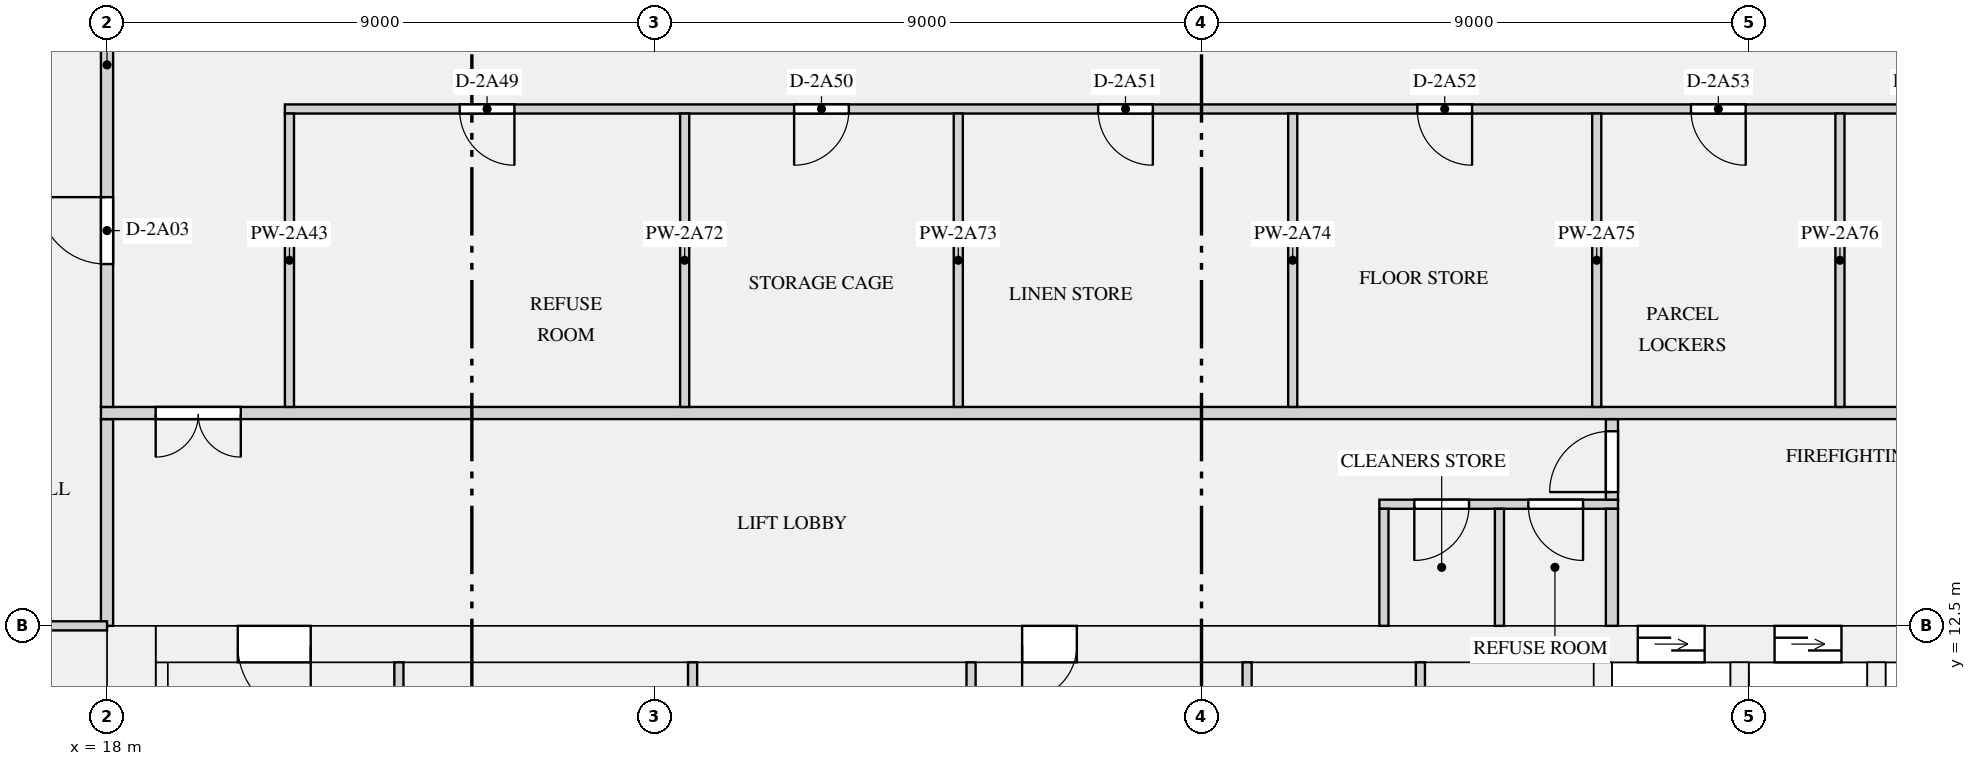
"""IFC4 building model, lengths in metres.
Left out: names, types, materials, properties, quantities, classifications, styles, units other than length and angle.
Written with IfcOpenShell. Run it as: python <this file> out.ifc"""

import sys

from ifc_helpers import new_model, si_unit, direction, frame, frame_2d, origin, place, context, subcontext, project, spatial, rectangle, extrude, element, fill, save


model = new_model("IFC4")
c1 = context("Model", 3, precision=1e-05, world=origin(), true_north=direction((0.0, 1.0)))
c2 = subcontext(c1, "Body", "Model", "MODEL_VIEW")
j1 = project(units=[si_unit("LENGTHUNIT", "METRE"), si_unit("PLANEANGLEUNIT", "RADIAN")], contexts=[c1])
p1 = place(None, origin())
s1 = spatial("IfcSite", under=j1, at=p1, CompositionType="ELEMENT")
p2 = place(p1, origin())
s2 = spatial("IfcBuilding", under=s1, at=p2, CompositionType="ELEMENT")
p3 = place(p2, frame((0.0, 0.0, 83.55)))
s3 = spatial("IfcBuildingStorey", under=s2, at=p3, CompositionType="ELEMENT", Elevation=83.55)
p4 = place(p3, frame((18.4, 0.0, 0.0), z_axis=(0.0, 0.0, 1.0), x_axis=(0.0, 1.0, 0.0)))
e1 = element("IfcWall", 1, at=p4, inside=s3, PredefinedType="SHEAR", context=c2, shape_type="SweptSolid", body=[
    extrude(rectangle(XDim=12.5, YDim=0.8, at=frame_2d((6.25, 0.0))), origin(), (0.0, 0.0, 1.0), 3.15),
])
p5 = place(p3, frame((18.8, 12.2, 0.0), z_axis=(0.0, 0.0, 1.0), x_axis=(1.0, 0.0, 0.0)))
e2 = element("IfcWall", 2, at=p5, inside=s3, PredefinedType="SHEAR", context=c2, shape_type="SweptSolid", body=[
    extrude(rectangle(XDim=34.4, YDim=0.6, at=frame_2d((17.2, 0.0))), origin(), (0.0, 0.0, 1.0), 3.15),
])
p6 = place(p5, frame((24.375, 0.0, 0.0)))
e3 = element("IfcOpeningElement", 3, at=p6, cuts=e2, PredefinedType="OPENING", context=c2, shape_type="SweptSolid", body=[
    extrude(rectangle(XDim=1.1, YDim=2.1, at=frame_2d((0.55, 1.05))), frame((0.0, 0.31, 0.0), z_axis=(0.0, -1.0, 0.0), x_axis=(1.0, 0.0, 0.0)), (0.0, 0.0, 1.0), 0.62),
])
p7 = place(p5, frame((26.625, 0.0, 0.0)))
e4 = element("IfcOpeningElement", 4, at=p7, cuts=e2, PredefinedType="OPENING", context=c2, shape_type="SweptSolid", body=[
    extrude(rectangle(XDim=1.1, YDim=2.1, at=frame_2d((0.55, 1.05))), frame((0.0, 0.31, 0.0), z_axis=(0.0, -1.0, 0.0), x_axis=(1.0, 0.0, 0.0)), (0.0, 0.0, 1.0), 0.62),
])
p8 = place(p5, frame((28.875, 0.0, 0.0)))
e5 = element("IfcOpeningElement", 5, at=p8, cuts=e2, PredefinedType="OPENING", context=c2, shape_type="SweptSolid", body=[
    extrude(rectangle(XDim=1.1, YDim=2.1, at=frame_2d((0.55, 1.05))), frame((0.0, 0.31, 0.0), z_axis=(0.0, -1.0, 0.0), x_axis=(1.0, 0.0, 0.0)), (0.0, 0.0, 1.0), 0.62),
])
p9 = place(p5, frame((14.25, 0.0, 0.0)))
e6 = element("IfcOpeningElement", 6, at=p9, cuts=e2, PredefinedType="OPENING", context=c2, shape_type="SweptSolid", body=[
    extrude(rectangle(XDim=0.9, YDim=2.1, at=frame_2d((0.45, 1.05))), frame((0.0, 0.31, 0.0), z_axis=(0.0, -1.0, 0.0), x_axis=(1.0, 0.0, 0.0)), (0.0, 0.0, 1.0), 0.62),
])
p10 = place(p5, frame((1.35, 0.0, 0.0)))
e7 = element("IfcOpeningElement", 7, at=p10, cuts=e2, PredefinedType="OPENING", context=c2, shape_type="SweptSolid", body=[
    extrude(rectangle(XDim=1.2, YDim=2.1, at=frame_2d((0.6, 1.05))), frame((0.0, 0.31, 0.0), z_axis=(0.0, -1.0, 0.0), x_axis=(1.0, 0.0, 0.0)), (0.0, 0.0, 1.0), 0.62),
])
p11 = place(p5, frame((31.85, 0.0, 0.0)))
e8 = element("IfcOpeningElement", 8, at=p11, cuts=e2, PredefinedType="OPENING", context=c2, shape_type="SweptSolid", body=[
    extrude(rectangle(XDim=1.2, YDim=2.1, at=frame_2d((0.6, 1.05))), frame((0.0, 0.31, 0.0), z_axis=(0.0, -1.0, 0.0), x_axis=(1.0, 0.0, 0.0)), (0.0, 0.0, 1.0), 0.62),
])
p12 = place(p3, frame((18.9, 1.0, 0.0), z_axis=(0.0, 0.0, 1.0), x_axis=(0.0, 1.0, 0.0)))
e9 = element("IfcWall", 9, at=p12, inside=s3, PredefinedType="SHEAR", context=c2, shape_type="SweptSolid", body=[
    extrude(rectangle(XDim=10.9, YDim=0.2, at=frame_2d((5.45, 0.0))), origin(), (0.0, 0.0, 1.0), 3.15),
])
for number, where, z_axis, x_axis in (
    (10, (42.6, 8.25, 0.0), (0.0, 0.0, 1.0), (0.0, 1.0, 0.0)),
    (11, (44.85, 8.25, 0.0), (0.0, 0.0, 1.0), (0.0, 1.0, 0.0)),
    (12, (47.1, 8.25, 0.0), (0.0, 0.0, 1.0), (0.0, 1.0, 0.0)),
):
    element("IfcWall", number, at=place(p3, frame(where, z_axis=z_axis, x_axis=x_axis)), inside=s3, PredefinedType="SHEAR", context=c2, shape_type="SweptSolid", body=[
        extrude(rectangle(XDim=3.65, YDim=0.3, at=frame_2d((1.825, 0.0))), origin(), (0.0, 0.0, 1.0), 3.15),
    ])
p13 = place(p3, frame((38.925, 14.5, 0.0), z_axis=(0.0, 0.0, 1.0), x_axis=(1.0, 0.0, 0.0)))
e13 = element("IfcWall", 13, at=p13, inside=s3, PredefinedType="PARTITIONING", context=c2, shape_type="SweptSolid", body=[
    extrude(rectangle(XDim=3.925, YDim=0.15, at=frame_2d((1.962, 0.0))), origin(), (0.0, 0.0, 1.0), 2.83),
])
p14 = place(p13, frame((0.575, 0.0, 0.0)))
e14 = element("IfcOpeningElement", 14, at=p14, cuts=e13, PredefinedType="OPENING", context=c2, shape_type="SweptSolid", body=[
    extrude(rectangle(XDim=0.9, YDim=2.1, at=frame_2d((0.45, 1.05))), frame((0.0, 0.085, 0.0), z_axis=(0.0, -1.0, 0.0), x_axis=(1.0, 0.0, 0.0)), (0.0, 0.0, 1.0), 0.17),
])
p15 = place(p13, frame((2.45, 0.0, 0.0)))
e15 = element("IfcOpeningElement", 15, at=p15, cuts=e13, PredefinedType="OPENING", context=c2, shape_type="SweptSolid", body=[
    extrude(rectangle(XDim=0.9, YDim=2.1, at=frame_2d((0.45, 1.05))), frame((0.0, 0.085, 0.0), z_axis=(0.0, -1.0, 0.0), x_axis=(1.0, 0.0, 0.0)), (0.0, 0.0, 1.0), 0.17),
])
for number, where, z_axis, x_axis in (
    (16, (22.8, 6.725, 0.0), (0.0, 0.0, 1.0), (0.0, 1.0, 0.0)),
    (17, (27.63, 6.725, 0.0), (0.0, 0.0, 1.0), (0.0, 1.0, 0.0)),
    (18, (39.6, 6.725, 0.0), (0.0, 0.0, 1.0), (0.0, 1.0, 0.0)),
):
    element("IfcWall", number, at=place(p3, frame(where, z_axis=z_axis, x_axis=x_axis)), inside=s3, PredefinedType="PARTITIONING", context=c2, shape_type="SweptSolid", body=[
        extrude(rectangle(XDim=5.175, YDim=0.15, at=frame_2d((2.587, 0.0))), origin(), (0.0, 0.0, 1.0), 2.83),
    ])
for number, where, z_axis, x_axis in (
    (19, (32.21, 9.345, 0.0), (0.0, 0.0, 1.0), (0.0, 1.0, 0.0)),
    (20, (36.75, 9.345, 0.0), (0.0, 0.0, 1.0), (0.0, 1.0, 0.0)),
):
    element("IfcWall", number, at=place(p3, frame(where, z_axis=z_axis, x_axis=x_axis)), inside=s3, PredefinedType="PARTITIONING", context=c2, shape_type="SweptSolid", body=[
        extrude(rectangle(XDim=2.555, YDim=0.15, at=frame_2d((1.277, 0.0))), origin(), (0.0, 0.0, 1.0), 2.83),
    ])
p16 = place(p3, frame((18.0, 12.5, 0.0), z_axis=(0.0, 0.0, 1.0), x_axis=(0.0, 1.0, 0.0)))
e21 = element("IfcWall", 21, at=p16, inside=s3, PredefinedType="PARTITIONING", context=c2, shape_type="SweptSolid", body=[
    extrude(rectangle(XDim=3.4, YDim=0.2, at=frame_2d((1.7, 0.0))), origin(), (0.0, 0.0, 1.0), 2.83),
])
for number, where, z_axis, x_axis in (
    (22, (39.0, 12.5, 0.0), (0.0, 0.0, 1.0), (0.0, 1.0, 0.0)),
    (23, (40.9, 12.5, 0.0), (0.0, 0.0, 1.0), (0.0, 1.0, 0.0)),
):
    element("IfcWall", number, at=place(p3, frame(where, z_axis=z_axis, x_axis=x_axis)), inside=s3, PredefinedType="PARTITIONING", context=c2, shape_type="SweptSolid", body=[
        extrude(rectangle(XDim=1.925, YDim=0.15, at=frame_2d((0.962, 0.0))), origin(), (0.0, 0.0, 1.0), 2.83),
    ])
p17 = place(p3, frame((42.75, 12.5, 0.0), z_axis=(0.0, 0.0, 1.0), x_axis=(0.0, 1.0, 0.0)))
e24 = element("IfcWall", 24, at=p17, inside=s3, PredefinedType="PARTITIONING", context=c2, shape_type="SweptSolid", body=[
    extrude(rectangle(XDim=1.925, YDim=0.2, at=frame_2d((0.962, 0.0))), origin(), (0.0, 0.0, 1.0), 2.83),
])
p18 = place(p3, frame((42.75, 14.575, 0.0), z_axis=(0.0, 0.0, 1.0), x_axis=(0.0, 1.0, 0.0)))
e25 = element("IfcWall", 25, at=p18, inside=s3, PredefinedType="PARTITIONING", context=c2, shape_type="SweptSolid", body=[
    extrude(rectangle(XDim=1.325, YDim=0.2, at=frame_2d((0.663, 0.0))), origin(), (0.0, 0.0, 1.0), 2.83),
])
p19 = place(p18, frame((0.125, 0.0, 0.0)))
e26 = element("IfcOpeningElement", 26, at=p19, cuts=e25, PredefinedType="OPENING", context=c2, shape_type="SweptSolid", body=[
    extrude(rectangle(XDim=1.0, YDim=2.1, at=frame_2d((0.5, 1.05))), frame((0.0, 0.11, 0.0), z_axis=(0.0, -1.0, 0.0), x_axis=(1.0, 0.0, 0.0)), (0.0, 0.0, 1.0), 0.22),
])
p20 = place(p3, frame((20.925, 21.0, 0.0), z_axis=(0.0, 0.0, 1.0), x_axis=(1.0, 0.0, 0.0)))
e27 = element("IfcWall", 27, at=p20, inside=s3, PredefinedType="PARTITIONING", context=c2, shape_type="SweptSolid", body=[
    extrude(rectangle(XDim=30.15, YDim=0.15, at=frame_2d((15.075, 0.0))), origin(), (0.0, 0.0, 1.0), 2.83),
])
p21 = place(p20, frame((2.875, 0.0, 0.0)))
e28 = element("IfcOpeningElement", 28, at=p21, cuts=e27, PredefinedType="OPENING", context=c2, shape_type="SweptSolid", body=[
    extrude(rectangle(XDim=0.9, YDim=2.1, at=frame_2d((0.45, 1.05))), frame((0.0, 0.085, 0.0), z_axis=(0.0, -1.0, 0.0), x_axis=(1.0, 0.0, 0.0)), (0.0, 0.0, 1.0), 0.17),
])
p22 = place(p20, frame((8.375, 0.0, 0.0)))
e29 = element("IfcOpeningElement", 29, at=p22, cuts=e27, PredefinedType="OPENING", context=c2, shape_type="SweptSolid", body=[
    extrude(rectangle(XDim=0.9, YDim=2.1, at=frame_2d((0.45, 1.05))), frame((0.0, 0.085, 0.0), z_axis=(0.0, -1.0, 0.0), x_axis=(1.0, 0.0, 0.0)), (0.0, 0.0, 1.0), 0.17),
])
p23 = place(p20, frame((13.375, 0.0, 0.0)))
e30 = element("IfcOpeningElement", 30, at=p23, cuts=e27, PredefinedType="OPENING", context=c2, shape_type="SweptSolid", body=[
    extrude(rectangle(XDim=0.9, YDim=2.1, at=frame_2d((0.45, 1.05))), frame((0.0, 0.085, 0.0), z_axis=(0.0, -1.0, 0.0), x_axis=(1.0, 0.0, 0.0)), (0.0, 0.0, 1.0), 0.17),
])
p24 = place(p20, frame((18.625, 0.0, 0.0)))
e31 = element("IfcOpeningElement", 31, at=p24, cuts=e27, PredefinedType="OPENING", context=c2, shape_type="SweptSolid", body=[
    extrude(rectangle(XDim=0.9, YDim=2.1, at=frame_2d((0.45, 1.05))), frame((0.0, 0.085, 0.0), z_axis=(0.0, -1.0, 0.0), x_axis=(1.0, 0.0, 0.0)), (0.0, 0.0, 1.0), 0.17),
])
p25 = place(p20, frame((23.125, 0.0, 0.0)))
e32 = element("IfcOpeningElement", 32, at=p25, cuts=e27, PredefinedType="OPENING", context=c2, shape_type="SweptSolid", body=[
    extrude(rectangle(XDim=0.9, YDim=2.1, at=frame_2d((0.45, 1.05))), frame((0.0, 0.085, 0.0), z_axis=(0.0, -1.0, 0.0), x_axis=(1.0, 0.0, 0.0)), (0.0, 0.0, 1.0), 0.17),
])
p26 = place(p3, frame((13.425, 12.5, 0.0), z_axis=(0.0, 0.0, 1.0), x_axis=(1.0, 0.0, 0.0)))
e33 = element("IfcWall", 33, at=p26, inside=s3, PredefinedType="PARTITIONING", context=c2, shape_type="SweptSolid", body=[
    extrude(rectangle(XDim=4.575, YDim=0.15, at=frame_2d((2.288, 0.0))), origin(), (0.0, 0.0, 1.0), 2.83),
])
p27 = place(p26, frame((1.875, 0.0, 0.0)))
e34 = element("IfcOpeningElement", 34, at=p27, cuts=e33, PredefinedType="OPENING", context=c2, shape_type="SweptSolid", body=[
    extrude(rectangle(XDim=0.9, YDim=2.1, at=frame_2d((0.45, 1.05))), frame((0.0, 0.085, 0.0), z_axis=(0.0, -1.0, 0.0), x_axis=(1.0, 0.0, 0.0)), (0.0, 0.0, 1.0), 0.17),
])
p28 = place(p3, frame((17.9, 16.0, 0.0), z_axis=(0.0, 0.0, 1.0), x_axis=(1.0, 0.0, 0.0)))
e35 = element("IfcWall", 35, at=p28, inside=s3, PredefinedType="PARTITIONING", context=c2, shape_type="SweptSolid", body=[
    extrude(rectangle(XDim=36.2, YDim=0.2, at=frame_2d((18.1, 0.0))), origin(), (0.0, 0.0, 1.0), 2.83),
])
p29 = place(p28, frame((0.9, 0.0, 0.0)))
e36 = element("IfcOpeningElement", 36, at=p29, cuts=e35, PredefinedType="OPENING", context=c2, shape_type="SweptSolid", body=[
    extrude(rectangle(XDim=1.4, YDim=2.1, at=frame_2d((0.7, 1.05))), frame((0.0, 0.11, 0.0), z_axis=(0.0, -1.0, 0.0), x_axis=(1.0, 0.0, 0.0)), (0.0, 0.0, 1.0), 0.22),
])
p30 = place(p28, frame((33.9, 0.0, 0.0)))
e37 = element("IfcOpeningElement", 37, at=p30, cuts=e35, PredefinedType="OPENING", context=c2, shape_type="SweptSolid", body=[
    extrude(rectangle(XDim=1.4, YDim=2.1, at=frame_2d((0.7, 1.05))), frame((0.0, 0.11, 0.0), z_axis=(0.0, -1.0, 0.0), x_axis=(1.0, 0.0, 0.0)), (0.0, 0.0, 1.0), 0.22),
])
p31 = place(p3, frame((18.0, 16.1, 0.0), z_axis=(0.0, 0.0, 1.0), x_axis=(0.0, 1.0, 0.0)))
e38 = element("IfcWall", 38, at=p31, inside=s3, PredefinedType="PARTITIONING", context=c2, shape_type="SweptSolid", body=[
    extrude(rectangle(XDim=7.8, YDim=0.2, at=frame_2d((3.9, 0.0))), origin(), (0.0, 0.0, 1.0), 2.83),
])
p32 = place(p31, frame((2.35, 0.0, 0.0)))
e39 = element("IfcOpeningElement", 39, at=p32, cuts=e38, PredefinedType="OPENING", context=c2, shape_type="SweptSolid", body=[
    extrude(rectangle(XDim=1.1, YDim=2.1, at=frame_2d((0.55, 1.05))), frame((0.0, 0.11, 0.0), z_axis=(0.0, -1.0, 0.0), x_axis=(1.0, 0.0, 0.0)), (0.0, 0.0, 1.0), 0.22),
])
for number, where, z_axis, x_axis in (
    (40, (21.0, 16.1, 0.0), (0.0, 0.0, 1.0), (0.0, 1.0, 0.0)),
    (41, (27.5, 16.1, 0.0), (0.0, 0.0, 1.0), (0.0, 1.0, 0.0)),
    (42, (32.0, 16.1, 0.0), (0.0, 0.0, 1.0), (0.0, 1.0, 0.0)),
    (43, (37.5, 16.1, 0.0), (0.0, 0.0, 1.0), (0.0, 1.0, 0.0)),
    (44, (42.5, 16.1, 0.0), (0.0, 0.0, 1.0), (0.0, 1.0, 0.0)),
    (45, (46.5, 16.1, 0.0), (0.0, 0.0, 1.0), (0.0, 1.0, 0.0)),
):
    element("IfcWall", number, at=place(p3, frame(where, z_axis=z_axis, x_axis=x_axis)), inside=s3, PredefinedType="PARTITIONING", context=c2, shape_type="SweptSolid", body=[
        extrude(rectangle(XDim=4.825, YDim=0.15, at=frame_2d((2.413, 0.0))), origin(), (0.0, 0.0, 1.0), 2.83),
    ])
p33 = place(p6, origin())
e46 = element("IfcDoor", 46, at=p33, inside=s3, OperationType="DOUBLE_DOOR_SLIDING", PredefinedType="DOOR", context=c2, shape_type="SweptSolid", body=[
    extrude(rectangle(XDim=1.1, YDim=2.1, at=frame_2d((0.55, 1.05))), frame((0.0, 0.025, 0.0), z_axis=(0.0, -1.0, 0.0), x_axis=(1.0, 0.0, 0.0)), (0.0, 0.0, 1.0), 0.05),
])
fill(e3, e46)
p34 = place(p7, origin())
e47 = element("IfcDoor", 47, at=p34, inside=s3, OperationType="DOUBLE_DOOR_SLIDING", PredefinedType="DOOR", context=c2, shape_type="SweptSolid", body=[
    extrude(rectangle(XDim=1.1, YDim=2.1, at=frame_2d((0.55, 1.05))), frame((0.0, 0.025, 0.0), z_axis=(0.0, -1.0, 0.0), x_axis=(1.0, 0.0, 0.0)), (0.0, 0.0, 1.0), 0.05),
])
fill(e4, e47)
p35 = place(p14, frame((0.9, 0.0, 0.0), z_axis=(0.0, 0.0, 1.0), x_axis=(-1.0, 0.0, 0.0)))
e48 = element("IfcDoor", 48, at=p35, inside=s3, OperationType="SINGLE_SWING_RIGHT", PredefinedType="DOOR", context=c2, shape_type="SweptSolid", body=[
    extrude(rectangle(XDim=0.9, YDim=2.1, at=frame_2d((0.45, 1.05))), frame((0.0, 0.025, 0.0), z_axis=(0.0, -1.0, 0.0), x_axis=(1.0, 0.0, 0.0)), (0.0, 0.0, 1.0), 0.05),
])
fill(e14, e48)
p36 = place(p15, frame((0.9, 0.0, 0.0), z_axis=(0.0, 0.0, 1.0), x_axis=(-1.0, 0.0, 0.0)))
e49 = element("IfcDoor", 49, at=p36, inside=s3, OperationType="SINGLE_SWING_LEFT", PredefinedType="DOOR", context=c2, shape_type="SweptSolid", body=[
    extrude(rectangle(XDim=0.9, YDim=2.1, at=frame_2d((0.45, 1.05))), frame((0.0, 0.025, 0.0), z_axis=(0.0, -1.0, 0.0), x_axis=(1.0, 0.0, 0.0)), (0.0, 0.0, 1.0), 0.05),
])
fill(e15, e49)
p37 = place(p9, frame((0.9, 0.0, 0.0), z_axis=(0.0, 0.0, 1.0), x_axis=(-1.0, 0.0, 0.0)))
e50 = element("IfcDoor", 50, at=p37, inside=s3, OperationType="SINGLE_SWING_RIGHT", PredefinedType="DOOR", context=c2, shape_type="SweptSolid", body=[
    extrude(rectangle(XDim=0.9, YDim=2.1, at=frame_2d((0.45, 1.05))), frame((0.0, 0.025, 0.0), z_axis=(0.0, -1.0, 0.0), x_axis=(1.0, 0.0, 0.0)), (0.0, 0.0, 1.0), 0.05),
])
fill(e6, e50)
p38 = place(p10, frame((1.2, 0.0, 0.0), z_axis=(0.0, 0.0, 1.0), x_axis=(-1.0, 0.0, 0.0)))
e51 = element("IfcDoor", 51, at=p38, inside=s3, OperationType="SINGLE_SWING_LEFT", PredefinedType="DOOR", context=c2, shape_type="SweptSolid", body=[
    extrude(rectangle(XDim=1.2, YDim=2.1, at=frame_2d((0.6, 1.05))), frame((0.0, 0.025, 0.0), z_axis=(0.0, -1.0, 0.0), x_axis=(1.0, 0.0, 0.0)), (0.0, 0.0, 1.0), 0.05),
])
fill(e7, e51)
p39 = place(p19, origin())
e52 = element("IfcDoor", 52, at=p39, inside=s3, OperationType="SINGLE_SWING_LEFT", PredefinedType="DOOR", context=c2, shape_type="SweptSolid", body=[
    extrude(rectangle(XDim=1.0, YDim=2.1, at=frame_2d((0.5, 1.05))), frame((0.0, 0.025, 0.0), z_axis=(0.0, -1.0, 0.0), x_axis=(1.0, 0.0, 0.0)), (0.0, 0.0, 1.0), 0.05),
])
fill(e26, e52)
p40 = place(p29, frame((1.4, 0.0, 0.0), z_axis=(0.0, 0.0, 1.0), x_axis=(-1.0, 0.0, 0.0)))
e53 = element("IfcDoor", 53, at=p40, inside=s3, OperationType="DOUBLE_DOOR_SINGLE_SWING", PredefinedType="DOOR", context=c2, shape_type="SweptSolid", body=[
    extrude(rectangle(XDim=1.4, YDim=2.1, at=frame_2d((0.7, 1.05))), frame((0.0, 0.025, 0.0), z_axis=(0.0, -1.0, 0.0), x_axis=(1.0, 0.0, 0.0)), (0.0, 0.0, 1.0), 0.05),
])
fill(e36, e53)
p41 = place(p32, origin())
e54 = element("IfcDoor", 54, at=p41, inside=s3, OperationType="SINGLE_SWING_RIGHT", PredefinedType="DOOR", context=c2, shape_type="SweptSolid", body=[
    extrude(rectangle(XDim=1.1, YDim=2.1, at=frame_2d((0.55, 1.05))), frame((0.0, 0.025, 0.0), z_axis=(0.0, -1.0, 0.0), x_axis=(1.0, 0.0, 0.0)), (0.0, 0.0, 1.0), 0.05),
])
fill(e39, e54)
p42 = place(p21, frame((0.9, 0.0, 0.0), z_axis=(0.0, 0.0, 1.0), x_axis=(-1.0, 0.0, 0.0)))
e55 = element("IfcDoor", 55, at=p42, inside=s3, OperationType="SINGLE_SWING_LEFT", PredefinedType="DOOR", context=c2, shape_type="SweptSolid", body=[
    extrude(rectangle(XDim=0.9, YDim=2.1, at=frame_2d((0.45, 1.05))), frame((0.0, 0.025, 0.0), z_axis=(0.0, -1.0, 0.0), x_axis=(1.0, 0.0, 0.0)), (0.0, 0.0, 1.0), 0.05),
])
fill(e28, e55)
p43 = place(p22, frame((0.9, 0.0, 0.0), z_axis=(0.0, 0.0, 1.0), x_axis=(-1.0, 0.0, 0.0)))
e56 = element("IfcDoor", 56, at=p43, inside=s3, OperationType="SINGLE_SWING_RIGHT", PredefinedType="DOOR", context=c2, shape_type="SweptSolid", body=[
    extrude(rectangle(XDim=0.9, YDim=2.1, at=frame_2d((0.45, 1.05))), frame((0.0, 0.025, 0.0), z_axis=(0.0, -1.0, 0.0), x_axis=(1.0, 0.0, 0.0)), (0.0, 0.0, 1.0), 0.05),
])
fill(e29, e56)
p44 = place(p23, frame((0.9, 0.0, 0.0), z_axis=(0.0, 0.0, 1.0), x_axis=(-1.0, 0.0, 0.0)))
e57 = element("IfcDoor", 57, at=p44, inside=s3, OperationType="SINGLE_SWING_LEFT", PredefinedType="DOOR", context=c2, shape_type="SweptSolid", body=[
    extrude(rectangle(XDim=0.9, YDim=2.1, at=frame_2d((0.45, 1.05))), frame((0.0, 0.025, 0.0), z_axis=(0.0, -1.0, 0.0), x_axis=(1.0, 0.0, 0.0)), (0.0, 0.0, 1.0), 0.05),
])
fill(e30, e57)
p45 = place(p24, frame((0.9, 0.0, 0.0), z_axis=(0.0, 0.0, 1.0), x_axis=(-1.0, 0.0, 0.0)))
e58 = element("IfcDoor", 58, at=p45, inside=s3, OperationType="SINGLE_SWING_LEFT", PredefinedType="DOOR", context=c2, shape_type="SweptSolid", body=[
    extrude(rectangle(XDim=0.9, YDim=2.1, at=frame_2d((0.45, 1.05))), frame((0.0, 0.025, 0.0), z_axis=(0.0, -1.0, 0.0), x_axis=(1.0, 0.0, 0.0)), (0.0, 0.0, 1.0), 0.05),
])
fill(e31, e58)
p46 = place(p25, frame((0.9, 0.0, 0.0), z_axis=(0.0, 0.0, 1.0), x_axis=(-1.0, 0.0, 0.0)))
e59 = element("IfcDoor", 59, at=p46, inside=s3, OperationType="SINGLE_SWING_LEFT", PredefinedType="DOOR", context=c2, shape_type="SweptSolid", body=[
    extrude(rectangle(XDim=0.9, YDim=2.1, at=frame_2d((0.45, 1.05))), frame((0.0, 0.025, 0.0), z_axis=(0.0, -1.0, 0.0), x_axis=(1.0, 0.0, 0.0)), (0.0, 0.0, 1.0), 0.05),
])
fill(e32, e59)
save(model, sys.argv[1])
